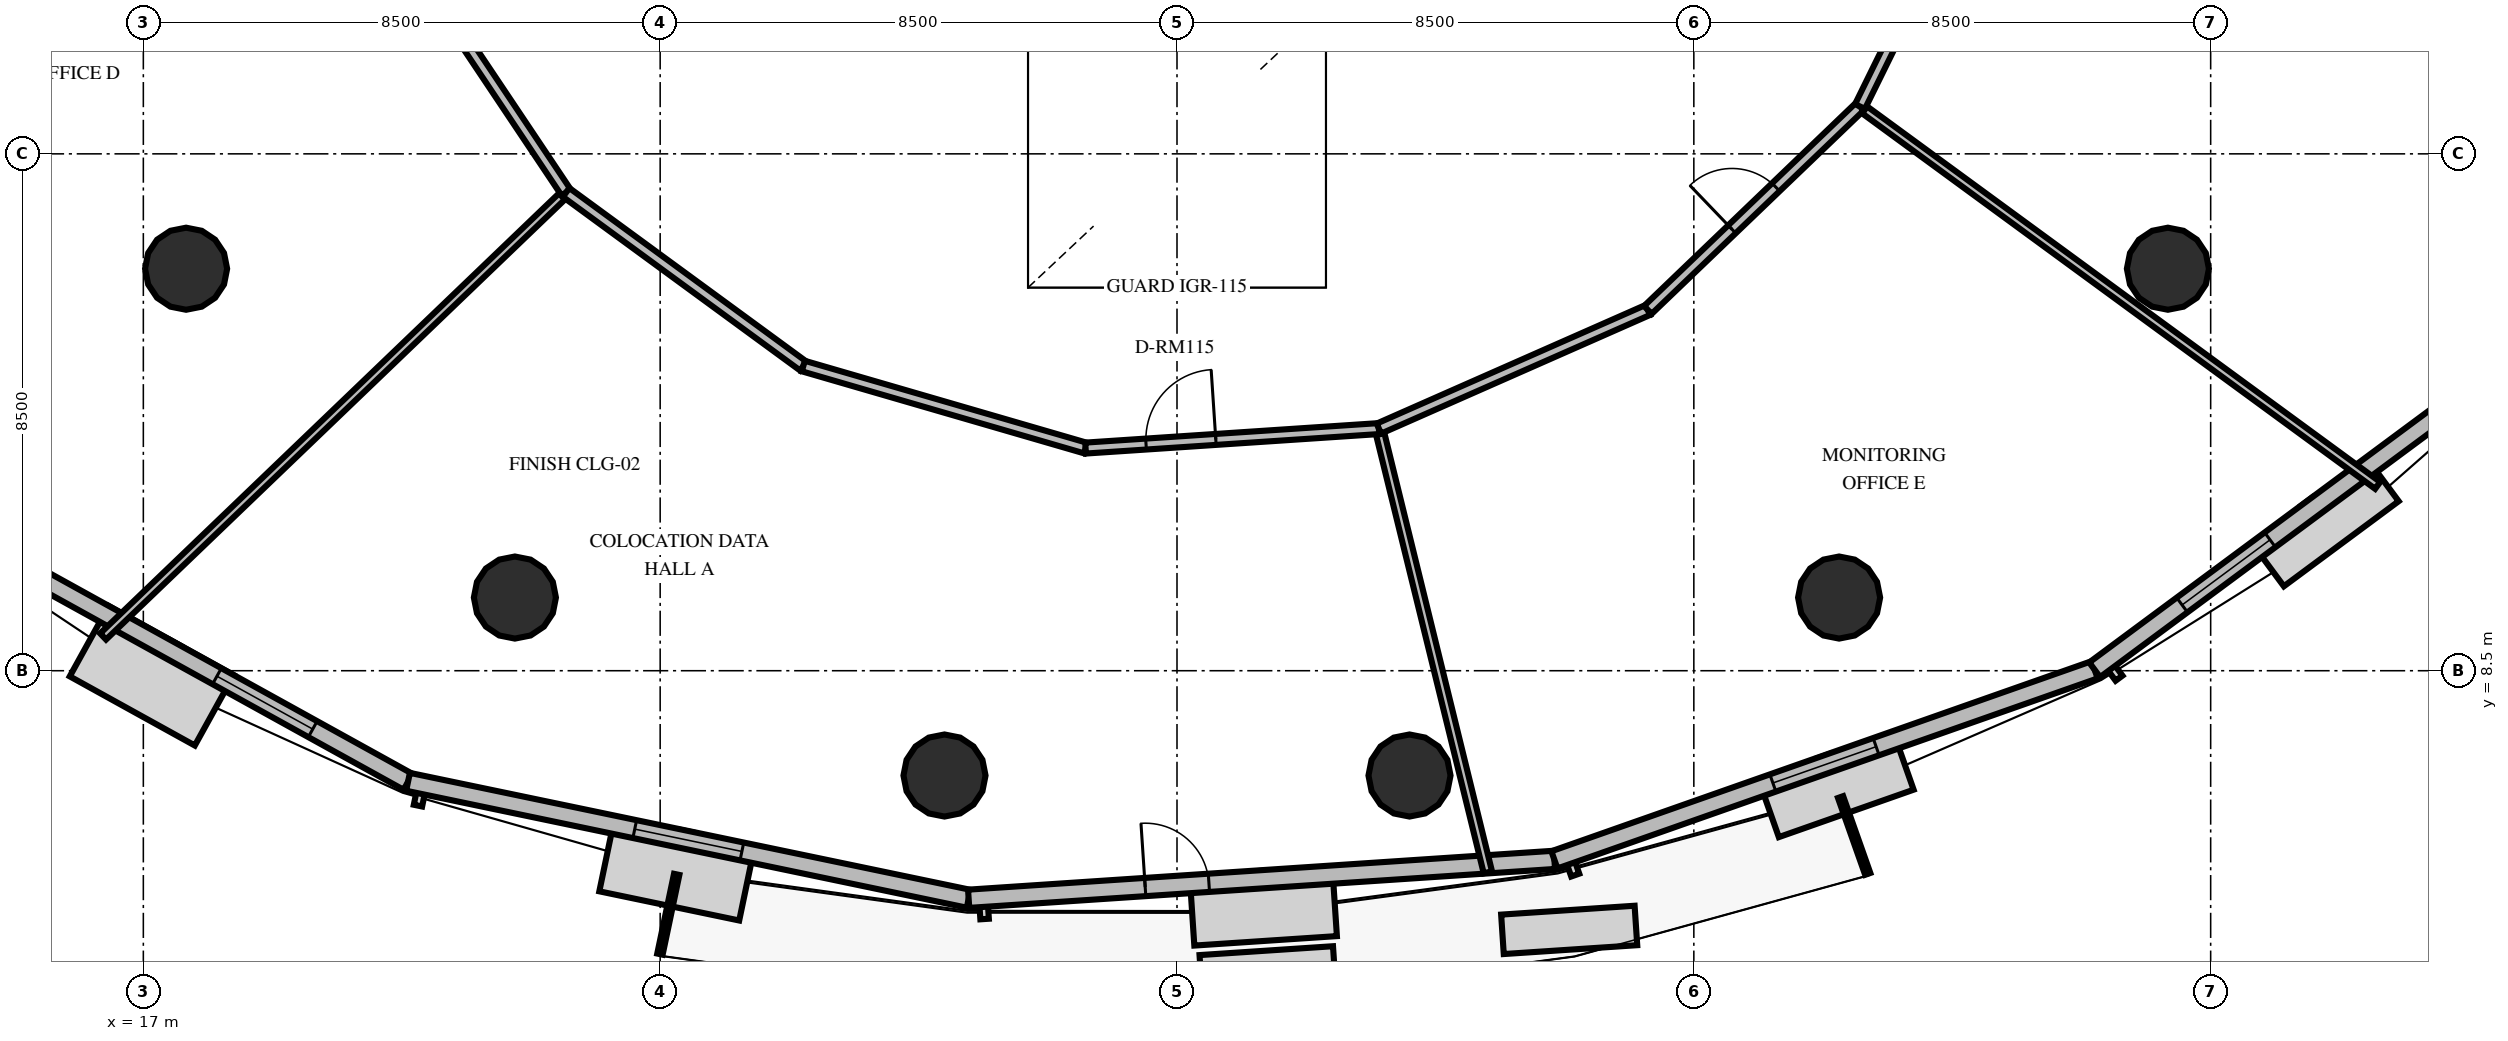
"""IFC4 building model, lengths in metres.
Left out: names, types, materials, properties, quantities, classifications, styles, units other than length and angle.
Written with IfcOpenShell. Run it as: python <this file> out.ifc"""

import sys

from ifc_helpers import new_model, si_unit, direction, frame, frame_2d, origin, origin_2d, place, context, subcontext, project, spatial, rectangle, circle, extrude, element, fill, save


model = new_model("IFC4")
c1 = context("Model", 3, precision=1e-05, world=origin(), true_north=direction((0.0, 1.0)))
c2 = subcontext(c1, "Body", "Model", "MODEL_VIEW")
j1 = project(units=[si_unit("LENGTHUNIT", "METRE"), si_unit("PLANEANGLEUNIT", "RADIAN")], contexts=[c1])
p1 = place(None, origin())
s1 = spatial("IfcSite", under=j1, at=p1, CompositionType="ELEMENT")
p2 = place(p1, origin())
s2 = spatial("IfcBuilding", under=s1, at=p2, CompositionType="ELEMENT")
p3 = place(p2, frame((0.0, 0.0, 46.8)))
s3 = spatial("IfcBuildingStorey", under=s2, at=p3, CompositionType="ELEMENT", Elevation=46.8)
for number, where, z_axis, x_axis in (
    (1, (17.703, 15.111, 0.0), (0.0, 0.0, 1.0), (1.0, 0.0, 0.0)),
    (2, (23.111, 9.703, 0.0), (0.0, 0.0, 1.0), (1.0, 0.0, 0.0)),
    (3, (30.176, 6.777, 0.0), (0.0, 0.0, 1.0), (1.0, 0.0, 0.0)),
    (4, (37.824, 6.777, 0.0), (0.0, 0.0, 1.0), (1.0, 0.0, 0.0)),
    (5, (44.889, 9.703, 0.0), (0.0, 0.0, 1.0), (1.0, 0.0, 0.0)),
    (6, (50.297, 15.111, 0.0), (0.0, 0.0, 1.0), (1.0, 0.0, 0.0)),
):
    element("IfcColumn", number, at=place(p3, frame(where, z_axis=z_axis, x_axis=x_axis)), inside=s3, PredefinedType="COLUMN", context=c2, shape_type="SweptSolid", body=[
        extrude(circle(Radius=0.675, at=origin_2d()), origin(), (0.0, 0.0, 1.0), 4.2),
    ])
p4 = place(p3, frame((13.658, 10.927, 0.0), z_axis=(0.0, 0.0, 1.0), x_axis=(0.875145624266, -0.48385962461, 0.0)))
e7 = element("IfcWall", 7, at=p4, inside=s3, PredefinedType="SOLIDWALL", context=c2, shape_type="SweptSolid", body=[
    extrude(rectangle(XDim=8.793, YDim=0.3, at=frame_2d((4.396, 0.0))), origin(), (0.0, 0.0, 1.0), 3.0),
])
p5 = place(p4, frame((5.202, 0.0, 0.8)))
e8 = element("IfcOpeningElement", 8, at=p5, cuts=e7, PredefinedType="OPENING", context=c2, shape_type="SweptSolid", body=[
    extrude(rectangle(XDim=1.8, YDim=1.95, at=frame_2d((0.9, 0.975))), frame((0.0, 0.16, 0.0), z_axis=(0.0, -1.0, 0.0), x_axis=(1.0, 0.0, 0.0)), (0.0, 0.0, 1.0), 0.32),
])
p6 = place(p3, frame((21.353, 6.673, 0.0), z_axis=(0.0, 0.0, 1.0), x_axis=(0.978929281729, -0.20419956262, 0.0)))
e9 = element("IfcWall", 9, at=p6, inside=s3, PredefinedType="SOLIDWALL", context=c2, shape_type="SweptSolid", body=[
    extrude(rectangle(XDim=9.419, YDim=0.3, at=frame_2d((4.709, 0.0))), origin(), (0.0, 0.0, 1.0), 3.0),
])
p7 = place(p6, frame((3.809, 0.0, 0.8)))
e10 = element("IfcOpeningElement", 10, at=p7, cuts=e9, PredefinedType="OPENING", context=c2, shape_type="SweptSolid", body=[
    extrude(rectangle(XDim=1.8, YDim=1.95, at=frame_2d((0.9, 0.975))), frame((0.0, 0.16, 0.0), z_axis=(0.0, -1.0, 0.0), x_axis=(1.0, 0.0, 0.0)), (0.0, 0.0, 1.0), 0.32),
])
p8 = place(p3, frame((30.573, 4.75, 0.0), z_axis=(0.0, 0.0, 1.0), x_axis=(0.997801240682, 0.066277327145, 0.0)))
e11 = element("IfcWall", 11, at=p8, inside=s3, PredefinedType="SOLIDWALL", context=c2, shape_type="SweptSolid", body=[
    extrude(rectangle(XDim=9.655, YDim=0.3, at=frame_2d((4.827, 0.0))), origin(), (0.0, 0.0, 1.0), 3.0),
])
p9 = place(p8, frame((2.91, 0.0, 0.0)))
e12 = element("IfcOpeningElement", 12, at=p9, cuts=e11, PredefinedType="OPENING", context=c2, shape_type="SweptSolid", body=[
    extrude(rectangle(XDim=1.05, YDim=2.15, at=frame_2d((0.525, 1.075))), frame((0.0, 0.16, 0.0), z_axis=(0.0, -1.0, 0.0), x_axis=(1.0, 0.0, 0.0)), (0.0, 0.0, 1.0), 0.32),
])
p10 = place(p3, frame((40.207, 5.39, 0.0), z_axis=(0.0, 0.0, 1.0), x_axis=(0.943328169931, 0.33186136234, 0.0)))
e13 = element("IfcWall", 13, at=p10, inside=s3, PredefinedType="SOLIDWALL", context=c2, shape_type="SweptSolid", body=[
    extrude(rectangle(XDim=9.419, YDim=0.3, at=frame_2d((4.709, 0.0))), origin(), (0.0, 0.0, 1.0), 3.0),
])
p11 = place(p10, frame((3.809, 0.0, 0.8)))
e14 = element("IfcOpeningElement", 14, at=p11, cuts=e13, PredefinedType="OPENING", context=c2, shape_type="SweptSolid", body=[
    extrude(rectangle(XDim=1.8, YDim=1.95, at=frame_2d((0.9, 0.975))), frame((0.0, 0.16, 0.0), z_axis=(0.0, -1.0, 0.0), x_axis=(1.0, 0.0, 0.0)), (0.0, 0.0, 1.0), 0.32),
])
p12 = place(p3, frame((49.092, 8.515, 0.0), z_axis=(0.0, 0.0, 1.0), x_axis=(0.803465201032, 0.595351720187, 0.0)))
e15 = element("IfcWall", 15, at=p12, inside=s3, PredefinedType="SOLIDWALL", context=c2, shape_type="SweptSolid", body=[
    extrude(rectangle(XDim=8.792, YDim=0.3, at=frame_2d((4.396, 0.0))), origin(), (0.0, 0.0, 1.0), 3.0),
])
p13 = place(p12, frame((1.79, 0.0, 0.8)))
e16 = element("IfcOpeningElement", 16, at=p13, cuts=e15, PredefinedType="OPENING", context=c2, shape_type="SweptSolid", body=[
    extrude(rectangle(XDim=1.8, YDim=1.95, at=frame_2d((0.9, 0.975))), frame((0.0, 0.16, 0.0), z_axis=(0.0, -1.0, 0.0), x_axis=(1.0, 0.0, 0.0)), (0.0, 0.0, 1.0), 0.32),
])
p14 = place(p3, frame((23.953, 16.365, 0.0), z_axis=(0.0, 0.0, 1.0), x_axis=(-0.721750224286, -0.692153605599, 0.0)))
e17 = element("IfcWall", 17, at=p14, inside=s3, PredefinedType="PARTITIONING", context=c2, shape_type="SweptSolid", body=[
    extrude(rectangle(XDim=10.55, YDim=0.14, at=frame_2d((5.275, 0.0))), origin(), (0.0, 0.0, 1.0), 3.0),
])
p15 = place(p3, frame((21.264, 20.383, 0.0), z_axis=(0.0, 0.0, 1.0), x_axis=(0.556295861918, -0.830984304312, 0.0)))
e18 = element("IfcWall", 18, at=p15, inside=s3, PredefinedType="PARTITIONING", context=c2, shape_type="SweptSolid", body=[
    extrude(rectangle(XDim=4.834, YDim=0.18, at=frame_2d((2.417, 0.0))), origin(), (0.0, 0.0, 1.0), 3.0),
])
p16 = place(p3, frame((37.32, 12.482, 0.0), z_axis=(0.0, 0.0, 1.0), x_axis=(0.238558066821, -0.971128234969, 0.0)))
e19 = element("IfcWall", 19, at=p16, inside=s3, PredefinedType="PARTITIONING", context=c2, shape_type="SweptSolid", body=[
    extrude(rectangle(XDim=7.514, YDim=0.14, at=frame_2d((3.757, 0.0))), origin(), (0.0, 0.0, 1.0), 3.0),
])
p17 = place(p3, frame((23.953, 16.365, 0.0), z_axis=(0.0, 0.0, 1.0), x_axis=(0.806956945118, -0.590610268049, 0.0)))
e20 = element("IfcWall", 20, at=p17, inside=s3, PredefinedType="PARTITIONING", context=c2, shape_type="SweptSolid", body=[
    extrude(rectangle(XDim=4.834, YDim=0.18, at=frame_2d((2.417, 0.0))), origin(), (0.0, 0.0, 1.0), 3.0),
])
p18 = place(p3, frame((27.854, 13.51, 0.0), z_axis=(0.0, 0.0, 1.0), x_axis=(0.960285136702, -0.279020530122, 0.0)))
e21 = element("IfcWall", 21, at=p18, inside=s3, PredefinedType="PARTITIONING", context=c2, shape_type="SweptSolid", body=[
    extrude(rectangle(XDim=4.834, YDim=0.18, at=frame_2d((2.417, 0.0))), origin(), (0.0, 0.0, 1.0), 3.0),
])
p19 = place(p3, frame((32.497, 12.161, 0.0), z_axis=(0.0, 0.0, 1.0), x_axis=(0.997802553219, 0.066257564016, 0.0)))
e22 = element("IfcWall", 22, at=p19, inside=s3, PredefinedType="PARTITIONING", context=c2, shape_type="SweptSolid", body=[
    extrude(rectangle(XDim=4.834, YDim=0.18, at=frame_2d((2.417, 0.0))), origin(), (0.0, 0.0, 1.0), 3.0),
])
p20 = place(p19, frame((0.996, 0.0, 0.0)))
e23 = element("IfcOpeningElement", 23, at=p20, cuts=e22, PredefinedType="OPENING", context=c2, shape_type="SweptSolid", body=[
    extrude(rectangle(XDim=1.15, YDim=2.15, at=frame_2d((0.575, 1.075))), frame((0.0, 0.1, 0.0), z_axis=(0.0, -1.0, 0.0), x_axis=(1.0, 0.0, 0.0)), (0.0, 0.0, 1.0), 0.2),
])
p21 = place(p3, frame((45.233, 17.779, 0.0), z_axis=(0.0, 0.0, 1.0), x_axis=(0.806954200192, -0.590614018453, 0.0)))
e24 = element("IfcWall", 24, at=p21, inside=s3, PredefinedType="PARTITIONING", context=c2, shape_type="SweptSolid", body=[
    extrude(rectangle(XDim=10.55, YDim=0.14, at=frame_2d((5.275, 0.0))), origin(), (0.0, 0.0, 1.0), 3.0),
])
p22 = place(p3, frame((37.32, 12.482, 0.0), z_axis=(0.0, 0.0, 1.0), x_axis=(0.914959483899, 0.403545713425, 0.0)))
e25 = element("IfcWall", 25, at=p22, inside=s3, PredefinedType="PARTITIONING", context=c2, shape_type="SweptSolid", body=[
    extrude(rectangle(XDim=4.834, YDim=0.18, at=frame_2d((2.417, 0.0))), origin(), (0.0, 0.0, 1.0), 3.0),
])
p23 = place(p3, frame((41.744, 14.433, 0.0), z_axis=(0.0, 0.0, 1.0), x_axis=(0.721748503055, 0.692155400425, 0.0)))
e26 = element("IfcWall", 26, at=p23, inside=s3, PredefinedType="PARTITIONING", context=c2, shape_type="SweptSolid", body=[
    extrude(rectangle(XDim=4.834, YDim=0.18, at=frame_2d((2.417, 0.0))), origin(), (0.0, 0.0, 1.0), 3.0),
])
p24 = place(p23, frame((1.917, 0.0, 0.0)))
e27 = element("IfcOpeningElement", 27, at=p24, cuts=e26, PredefinedType="OPENING", context=c2, shape_type="SweptSolid", body=[
    extrude(rectangle(XDim=1.0, YDim=2.15, at=frame_2d((0.5, 1.075))), frame((0.0, 0.1, 0.0), z_axis=(0.0, -1.0, 0.0), x_axis=(1.0, 0.0, 0.0)), (0.0, 0.0, 1.0), 0.2),
])
p25 = place(p3, frame((45.233, 17.779, 0.0), z_axis=(0.0, 0.0, 1.0), x_axis=(0.44148764498, 0.897267328799, 0.0)))
e28 = element("IfcWall", 28, at=p25, inside=s3, PredefinedType="PARTITIONING", context=c2, shape_type="SweptSolid", body=[
    extrude(rectangle(XDim=4.834, YDim=0.18, at=frame_2d((2.417, 0.0))), origin(), (0.0, 0.0, 1.0), 3.0),
])
p26 = place(p25, frame((2.801, 0.0, 0.0)))
e29 = element("IfcOpeningElement", 29, at=p26, cuts=e28, PredefinedType="OPENING", context=c2, shape_type="SweptSolid", body=[
    extrude(rectangle(XDim=1.0, YDim=2.15, at=frame_2d((0.5, 1.075))), frame((0.0, 0.1, 0.0), z_axis=(0.0, -1.0, 0.0), x_axis=(1.0, 0.0, 0.0)), (0.0, 0.0, 1.0), 0.2),
])
p27 = place(p5, origin())
e30 = element("IfcWindow", 30, at=p27, inside=s3, PartitioningType="SINGLE_PANEL", PredefinedType="WINDOW", context=c2, shape_type="SweptSolid", body=[
    extrude(rectangle(XDim=1.8, YDim=1.95, at=frame_2d((0.9, 0.975))), frame((0.0, 0.03, 0.0), z_axis=(0.0, -1.0, 0.0), x_axis=(1.0, 0.0, 0.0)), (0.0, 0.0, 1.0), 0.06),
])
fill(e8, e30)
p28 = place(p7, origin())
e31 = element("IfcWindow", 31, at=p28, inside=s3, PartitioningType="SINGLE_PANEL", PredefinedType="WINDOW", context=c2, shape_type="SweptSolid", body=[
    extrude(rectangle(XDim=1.8, YDim=1.95, at=frame_2d((0.9, 0.975))), frame((0.0, 0.03, 0.0), z_axis=(0.0, -1.0, 0.0), x_axis=(1.0, 0.0, 0.0)), (0.0, 0.0, 1.0), 0.06),
])
fill(e10, e31)
p29 = place(p9, origin())
e32 = element("IfcDoor", 32, at=p29, inside=s3, OperationType="SINGLE_SWING_LEFT", PredefinedType="DOOR", context=c2, shape_type="SweptSolid", body=[
    extrude(rectangle(XDim=1.05, YDim=2.15, at=frame_2d((0.525, 1.075))), frame((0.0, 0.025, 0.0), z_axis=(0.0, -1.0, 0.0), x_axis=(1.0, 0.0, 0.0)), (0.0, 0.0, 1.0), 0.05),
])
fill(e12, e32)
p30 = place(p11, origin())
e33 = element("IfcWindow", 33, at=p30, inside=s3, PartitioningType="SINGLE_PANEL", PredefinedType="WINDOW", context=c2, shape_type="SweptSolid", body=[
    extrude(rectangle(XDim=1.8, YDim=1.95, at=frame_2d((0.9, 0.975))), frame((0.0, 0.03, 0.0), z_axis=(0.0, -1.0, 0.0), x_axis=(1.0, 0.0, 0.0)), (0.0, 0.0, 1.0), 0.06),
])
fill(e14, e33)
p31 = place(p13, origin())
e34 = element("IfcWindow", 34, at=p31, inside=s3, PartitioningType="SINGLE_PANEL", PredefinedType="WINDOW", context=c2, shape_type="SweptSolid", body=[
    extrude(rectangle(XDim=1.8, YDim=1.95, at=frame_2d((0.9, 0.975))), frame((0.0, 0.03, 0.0), z_axis=(0.0, -1.0, 0.0), x_axis=(1.0, 0.0, 0.0)), (0.0, 0.0, 1.0), 0.06),
])
fill(e16, e34)
p32 = place(p20, origin())
e35 = element("IfcDoor", 35, at=p32, inside=s3, OperationType="SINGLE_SWING_RIGHT", PredefinedType="DOOR", context=c2, shape_type="SweptSolid", body=[
    extrude(rectangle(XDim=1.15, YDim=2.15, at=frame_2d((0.575, 1.075))), frame((0.0, 0.025, 0.0), z_axis=(0.0, -1.0, 0.0), x_axis=(1.0, 0.0, 0.0)), (0.0, 0.0, 1.0), 0.05),
])
fill(e23, e35)
p33 = place(p24, origin())
e36 = element("IfcDoor", 36, at=p33, inside=s3, OperationType="SINGLE_SWING_LEFT", PredefinedType="DOOR", context=c2, shape_type="SweptSolid", body=[
    extrude(rectangle(XDim=1.0, YDim=2.15, at=frame_2d((0.5, 1.075))), frame((0.0, 0.025, 0.0), z_axis=(0.0, -1.0, 0.0), x_axis=(1.0, 0.0, 0.0)), (0.0, 0.0, 1.0), 0.05),
])
fill(e27, e36)
save(model, sys.argv[1])
